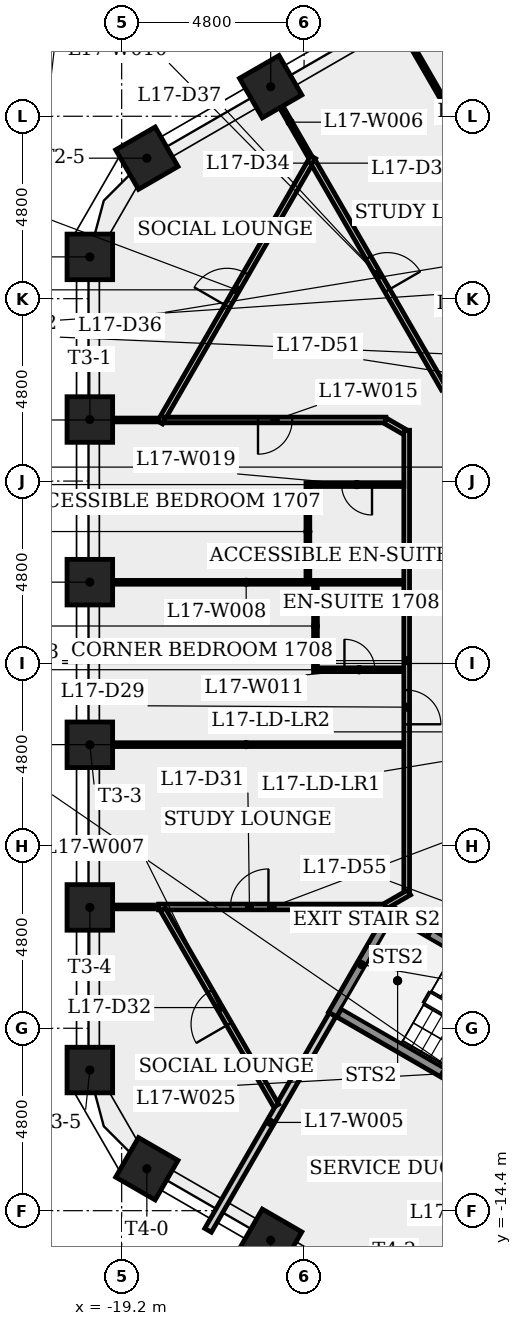
"""IFC4 building model, lengths in metres.
Left out: names, types, materials, properties, quantities, classifications, styles, units other than length and angle.
Written with IfcOpenShell. Run it as: python <this file> out.ifc"""

import sys

from ifc_helpers import new_model, si_unit, direction, frame, frame_2d, origin, origin_2d, place, context, subcontext, project, spatial, rectangle, extrude, element, fill, save


model = new_model("IFC4")
c1 = context("Model", 3, precision=1e-05, world=origin(), true_north=direction((0.0, 1.0)))
c2 = subcontext(c1, "Body", "Model", "MODEL_VIEW")
j1 = project(units=[si_unit("LENGTHUNIT", "METRE"), si_unit("PLANEANGLEUNIT", "RADIAN")], contexts=[c1])
p1 = place(None, origin())
s1 = spatial("IfcSite", under=j1, at=p1, CompositionType="ELEMENT")
p2 = place(p1, origin())
s2 = spatial("IfcBuilding", under=s1, at=p2, CompositionType="ELEMENT")
p3 = place(p2, frame((0.0, 0.0, 66.3)))
s3 = spatial("IfcBuildingStorey", under=s2, at=p3, CompositionType="ELEMENT", Elevation=66.3)
for number, where, z_axis, x_axis in (
    (1, (-15.28, 15.178, 0.0), (0.0, 0.0, 1.0), (-0.5, 0.866, 0.0)),
    (2, (-18.538, 13.297, 0.0), (0.0, 0.0, 1.0), (-0.5, 0.866, 0.0)),
    (3, (-20.038, 10.699, 0.0), (0.0, 0.0, 1.0), (-1.0, 0.0, 0.0)),
    (4, (-20.038, 6.42, 0.0), (0.0, 0.0, 1.0), (-1.0, 0.0, 0.0)),
    (5, (-20.038, 2.14, 0.0), (0.0, 0.0, 1.0), (-1.0, 0.0, 0.0)),
    (6, (-20.038, -2.14, 0.0), (0.0, 0.0, 1.0), (-1.0, 0.0, 0.0)),
    (7, (-20.038, -6.42, 0.0), (0.0, 0.0, 1.0), (-1.0, 0.0, 0.0)),
    (8, (-20.038, -10.699, 0.0), (0.0, 0.0, 1.0), (-1.0, 0.0, 0.0)),
    (9, (-18.538, -13.297, 0.0), (0.0, 0.0, 1.0), (-0.5, -0.866, 0.0)),
    (10, (-15.28, -15.178, 0.0), (0.0, 0.0, 1.0), (-0.5, -0.866, 0.0)),
):
    element("IfcColumn", number, at=place(p3, frame(where, z_axis=z_axis, x_axis=x_axis)), inside=s3, PredefinedType="COLUMN", context=c2, shape_type="SweptSolid", body=[
        extrude(rectangle(XDim=1.2, YDim=1.2, at=origin_2d()), origin(), (0.0, 0.0, 1.0), 4.0),
    ])
p4 = place(p3, frame((-18.228, 6.407, 0.0), z_axis=(0.0, 0.0, 1.0), x_axis=(-1.0, 0.0, 0.0)))
e11 = element("IfcWall", 11, at=p4, inside=s3, PredefinedType="PARTITIONING", context=c2, shape_type="SweptSolid", body=[
    extrude(rectangle(XDim=1.844, YDim=0.1, at=frame_2d((0.922, 0.0))), origin(), (0.0, 0.0, 1.0), 3.6),
])
p5 = place(p3, frame((-18.19, 6.343, 0.0), z_axis=(0.0, 0.0, 1.0), x_axis=(0.499980305572, 0.866036774069, 0.0)))
e12 = element("IfcWall", 12, at=p5, inside=s3, PredefinedType="PARTITIONING", context=c2, shape_type="SweptSolid", body=[
    extrude(rectangle(XDim=8.059, YDim=0.15, at=frame_2d((4.03, 0.0))), origin(), (0.0, 0.0, 1.0), 3.6),
])
p6 = place(p5, frame((3.53, 0.0, 0.0)))
e13 = element("IfcOpeningElement", 13, at=p6, cuts=e12, PredefinedType="OPENING", context=c2, shape_type="SweptSolid", body=[
    extrude(rectangle(XDim=1.0, YDim=2.1, at=frame_2d((0.5, 1.05))), frame((0.0, 0.085, 0.0), z_axis=(0.0, -1.0, 0.0), x_axis=(1.0, 0.0, 0.0)), (0.0, 0.0, 1.0), 0.17),
])
p7 = place(p3, frame((-18.228, -6.407, 0.0), z_axis=(0.0, 0.0, 1.0), x_axis=(1.0, 0.0, 0.0)))
e14 = element("IfcWall", 14, at=p7, inside=s3, PredefinedType="PARTITIONING", context=c2, shape_type="SweptSolid", body=[
    extrude(rectangle(XDim=5.981, YDim=0.15, at=frame_2d((2.99, 0.0))), origin(), (0.0, 0.0, 1.0), 3.6),
])
p8 = place(p7, frame((1.89, 0.0, 0.0)))
e15 = element("IfcOpeningElement", 15, at=p8, cuts=e14, PredefinedType="OPENING", context=c2, shape_type="SweptSolid", body=[
    extrude(rectangle(XDim=1.0, YDim=2.1, at=frame_2d((0.5, 1.05))), frame((0.0, 0.085, 0.0), z_axis=(0.0, -1.0, 0.0), x_axis=(1.0, 0.0, 0.0)), (0.0, 0.0, 1.0), 0.17),
])
p9 = place(p3, frame((-18.228, -6.407, 0.0), z_axis=(0.0, 0.0, 1.0), x_axis=(-1.0, 0.0, 0.0)))
e16 = element("IfcWall", 16, at=p9, inside=s3, PredefinedType="PARTITIONING", context=c2, shape_type="SweptSolid", body=[
    extrude(rectangle(XDim=1.845, YDim=0.1, at=frame_2d((0.922, 0.0))), origin(), (0.0, 0.0, 1.0), 3.6),
])
p10 = place(p3, frame((-16.926, -14.916, 0.0), z_axis=(0.0, 0.0, 1.0), x_axis=(0.499992165211, 0.866029927155, 0.0)))
e17 = element("IfcWall", 17, at=p10, inside=s3, PredefinedType="PLUMBINGWALL", context=c2, shape_type="SweptSolid", body=[
    extrude(rectangle(XDim=6.556, YDim=0.2, at=frame_2d((3.278, 0.0))), origin(), (0.0, 0.0, 1.0), 3.6),
])
p11 = place(p3, frame((-15.3, 15.166, 0.0), z_axis=(0.0, 0.0, 1.0), x_axis=(0.499937513688, -0.866061477268, 0.0)))
e18 = element("IfcWall", 18, at=p11, inside=s3, PredefinedType="PARTITIONING", context=c2, shape_type="SweptSolid", body=[
    extrude(rectangle(XDim=2.129, YDim=0.1, at=frame_2d((1.064, 0.0))), origin(), (0.0, 0.0, 1.0), 3.6),
])
p12 = place(p3, frame((-15.133, -11.638, 0.0), z_axis=(0.0, 0.0, 1.0), x_axis=(-0.499995262016, 0.866028139243, 0.0)))
e19 = element("IfcWall", 19, at=p12, inside=s3, PredefinedType="PARTITIONING", context=c2, shape_type="SweptSolid", body=[
    extrude(rectangle(XDim=5.965, YDim=0.15, at=frame_2d((2.982, 0.0))), origin(), (0.0, 0.0, 1.0), 3.6),
])
p13 = place(p12, frame((2.482, 0.0, 0.0)))
e20 = element("IfcOpeningElement", 20, at=p13, cuts=e19, PredefinedType="OPENING", context=c2, shape_type="SweptSolid", body=[
    extrude(rectangle(XDim=1.0, YDim=2.1, at=frame_2d((0.5, 1.05))), frame((0.0, 0.085, 0.0), z_axis=(0.0, -1.0, 0.0), x_axis=(1.0, 0.0, 0.0)), (0.0, 0.0, 1.0), 0.17),
])
p14 = place(p3, frame((-20.073, 2.136, 0.0), z_axis=(0.0, 0.0, 1.0), x_axis=(1.0, 0.0, 0.0)))
e21 = element("IfcWall", 21, at=p14, inside=s3, PredefinedType="PARTITIONING", context=c2, shape_type="SweptSolid", body=[
    extrude(rectangle(XDim=8.298, YDim=0.1, at=frame_2d((4.149, 0.0))), origin(), (0.0, 0.0, 1.0), 3.6),
])
p15 = place(p3, frame((-14.3, 4.758, 0.0), z_axis=(0.0, 0.0, 1.0), x_axis=(0.0, -1.0, 0.0)))
e22 = element("IfcWall", 22, at=p15, inside=s3, PredefinedType="PARTITIONING", context=c2, shape_type="SweptSolid", body=[
    extrude(rectangle(XDim=2.572, YDim=0.1, at=frame_2d((1.286, 0.0))), origin(), (0.0, 0.0, 1.0), 3.6),
])
p16 = place(p3, frame((-14.161, 13.192, 0.0), z_axis=(0.0, 0.0, 1.0), x_axis=(0.500005038635, -0.866022494708, 0.0)))
e23 = element("IfcWall", 23, at=p16, inside=s3, PredefinedType="PARTITIONING", context=c2, shape_type="SweptSolid", body=[
    extrude(rectangle(XDim=6.88, YDim=0.15, at=frame_2d((3.44, 0.0))), origin(), (0.0, 0.0, 1.0), 3.6),
])
p17 = place(p16, frame((2.903, 0.0, 0.0)))
e24 = element("IfcOpeningElement", 24, at=p17, cuts=e23, PredefinedType="OPENING", context=c2, shape_type="SweptSolid", body=[
    extrude(rectangle(XDim=1.0, YDim=2.1, at=frame_2d((0.5, 1.05))), frame((0.0, 0.085, 0.0), z_axis=(0.0, -1.0, 0.0), x_axis=(1.0, 0.0, 0.0)), (0.0, 0.0, 1.0), 0.17),
])
p18 = place(p3, frame((-14.15, -0.164, 0.0), z_axis=(0.0, 0.0, 1.0), x_axis=(1.0, 0.0, 0.0)))
e25 = element("IfcWall", 25, at=p18, inside=s3, PredefinedType="PARTITIONING", context=c2, shape_type="SweptSolid", body=[
    extrude(rectangle(XDim=2.375, YDim=0.1, at=frame_2d((1.188, 0.0))), origin(), (0.0, 0.0, 1.0), 3.6),
])
p19 = place(p18, frame((0.812, 0.0, 0.0)))
e26 = element("IfcOpeningElement", 26, at=p19, cuts=e25, PredefinedType="OPENING", context=c2, shape_type="SweptSolid", body=[
    extrude(rectangle(XDim=0.8, YDim=2.1, at=frame_2d((0.4, 1.05))), frame((0.0, 0.06, 0.0), z_axis=(0.0, -1.0, 0.0), x_axis=(1.0, 0.0, 0.0)), (0.0, 0.0, 1.0), 0.12),
])
p20 = place(p3, frame((-14.1, 2.086, 0.0), z_axis=(0.0, 0.0, 1.0), x_axis=(0.0, -1.0, 0.0)))
e27 = element("IfcWall", 27, at=p20, inside=s3, PredefinedType="PARTITIONING", context=c2, shape_type="SweptSolid", body=[
    extrude(rectangle(XDim=2.2, YDim=0.1, at=frame_2d((1.1, 0.0))), origin(), (0.0, 0.0, 1.0), 3.6),
])
p21 = place(p3, frame((-13.648, -9.239, 0.0), z_axis=(0.0, 0.0, 1.0), x_axis=(0.50000556753, 0.866022189346, 0.0)))
e28 = element("IfcWall", 28, at=p21, inside=s3, PredefinedType="SHEAR", context=c2, shape_type="SweptSolid", body=[
    extrude(rectangle(XDim=3.036, YDim=0.25, at=frame_2d((1.518, 0.0))), origin(), (0.0, 0.0, 1.0), 3.6),
])
p22 = place(p3, frame((-12.26, -6.385, 0.0), z_axis=(0.0, 0.0, 1.0), x_axis=(0.865943239699, 0.500142285375, 0.0)))
e29 = element("IfcWall", 29, at=p22, inside=s3, PredefinedType="PARTITIONING", context=c2, shape_type="SweptSolid", body=[
    extrude(rectangle(XDim=0.721, YDim=0.15, at=frame_2d((0.361, 0.0))), origin(), (0.0, 0.0, 1.0), 3.6),
])
p23 = place(p3, frame((-12.247, 6.407, 0.0), z_axis=(0.0, 0.0, 1.0), x_axis=(-1.0, 0.0, 0.0)))
e30 = element("IfcWall", 30, at=p23, inside=s3, PredefinedType="PARTITIONING", context=c2, shape_type="SweptSolid", body=[
    extrude(rectangle(XDim=5.831, YDim=0.15, at=frame_2d((2.916, 0.0))), origin(), (0.0, 0.0, 1.0), 3.6),
])
p24 = place(p23, frame((2.466, 0.0, 0.0)))
e31 = element("IfcOpeningElement", 31, at=p24, cuts=e30, PredefinedType="OPENING", context=c2, shape_type="SweptSolid", body=[
    extrude(rectangle(XDim=0.9, YDim=2.1, at=frame_2d((0.45, 1.05))), frame((0.0, 0.085, 0.0), z_axis=(0.0, -1.0, 0.0), x_axis=(1.0, 0.0, 0.0)), (0.0, 0.0, 1.0), 0.17),
])
p25 = place(p3, frame((-12.085, -6.532, 0.0), z_axis=(0.0, 0.0, 1.0), x_axis=(0.86604373436, -0.499968249168, 0.0)))
e32 = element("IfcWall", 32, at=p25, inside=s3, PredefinedType="SHEAR", context=c2, shape_type="SweptSolid", body=[
    extrude(rectangle(XDim=1.118, YDim=0.25, at=frame_2d((0.559, 0.0))), origin(), (0.0, 0.0, 1.0), 3.6),
])
p26 = place(p3, frame((-11.775, -2.136, 0.0), z_axis=(0.0, 0.0, 1.0), x_axis=(-1.0, 0.0, 0.0)))
e33 = element("IfcWall", 33, at=p26, inside=s3, PredefinedType="PARTITIONING", context=c2, shape_type="SweptSolid", body=[
    extrude(rectangle(XDim=8.298, YDim=0.1, at=frame_2d((4.149, 0.0))), origin(), (0.0, 0.0, 1.0), 3.6),
])
p27 = place(p3, frame((-11.7, 6.137, 0.0), z_axis=(0.0, 0.0, 1.0), x_axis=(0.0, -1.0, 0.0)))
e34 = element("IfcWall", 34, at=p27, inside=s3, PredefinedType="PARTITIONING", context=c2, shape_type="SweptSolid", body=[
    extrude(rectangle(XDim=12.125, YDim=0.15, at=frame_2d((6.062, 0.0))), origin(), (0.0, 0.0, 1.0), 3.6),
])
p28 = place(p27, frame((6.837, 0.0, 0.0)))
e35 = element("IfcOpeningElement", 35, at=p28, cuts=e34, PredefinedType="OPENING", context=c2, shape_type="SweptSolid", body=[
    extrude(rectangle(XDim=0.9, YDim=2.1, at=frame_2d((0.45, 1.05))), frame((0.0, 0.085, 0.0), z_axis=(0.0, -1.0, 0.0), x_axis=(1.0, 0.0, 0.0)), (0.0, 0.0, 1.0), 0.17),
])
p29 = place(p3, frame((-11.775, 4.708, 0.0), z_axis=(0.0, 0.0, 1.0), x_axis=(-1.0, 0.0, 0.0)))
e36 = element("IfcWall", 36, at=p29, inside=s3, PredefinedType="PARTITIONING", context=c2, shape_type="SweptSolid", body=[
    extrude(rectangle(XDim=2.475, YDim=0.1, at=frame_2d((1.238, 0.0))), origin(), (0.0, 0.0, 1.0), 3.6),
])
p30 = place(p29, frame((0.837, 0.0, 0.0)))
e37 = element("IfcOpeningElement", 37, at=p30, cuts=e36, PredefinedType="OPENING", context=c2, shape_type="SweptSolid", body=[
    extrude(rectangle(XDim=0.8, YDim=2.1, at=frame_2d((0.4, 1.05))), frame((0.0, 0.06, 0.0), z_axis=(0.0, -1.0, 0.0), x_axis=(1.0, 0.0, 0.0)), (0.0, 0.0, 1.0), 0.12),
])
p31 = place(p3, frame((-11.765, 6.1, 0.0), z_axis=(0.0, 0.0, 1.0), x_axis=(-0.865893856247, 0.500227777832, 0.0)))
e38 = element("IfcWall", 38, at=p31, inside=s3, PredefinedType="PARTITIONING", context=c2, shape_type="SweptSolid", body=[
    extrude(rectangle(XDim=0.572, YDim=0.15, at=frame_2d((0.286, 0.0))), origin(), (0.0, 0.0, 1.0), 3.6),
])
p32 = place(p3, frame((-11.1, -7.101, 0.0), z_axis=(0.0, 0.0, 1.0), x_axis=(0.866028615007, -0.499994437958, 0.0)))
e39 = element("IfcWall", 39, at=p32, inside=s3, PredefinedType="SHEAR", context=c2, shape_type="SweptSolid", body=[
    extrude(rectangle(XDim=5.387, YDim=0.25, at=frame_2d((2.694, 0.0))), origin(), (0.0, 0.0, 1.0), 3.6),
])
p33 = place(p32, frame((4.012, 0.0, 0.0)))
e40 = element("IfcOpeningElement", 40, at=p33, cuts=e39, PredefinedType="OPENING", context=c2, shape_type="SweptSolid", body=[
    extrude(rectangle(XDim=1.0, YDim=2.1, at=frame_2d((0.5, 1.05))), frame((0.0, 0.135, 0.0), z_axis=(0.0, -1.0, 0.0), x_axis=(1.0, 0.0, 0.0)), (0.0, 0.0, 1.0), 0.27),
])
p34 = place(p3, frame((-7.935, -12.393, 0.0), z_axis=(0.0, 0.0, 1.0), x_axis=(-0.866025499775, 0.499999833739, 0.0)))
e41 = element("IfcWall", 41, at=p34, inside=s3, PredefinedType="SHEAR", context=c2, shape_type="SweptSolid", body=[
    extrude(rectangle(XDim=6.4, YDim=0.25, at=frame_2d((3.2, 0.0))), origin(), (0.0, 0.0, 1.0), 3.6),
])
p35 = place(p3, frame((-7.8, -13.51, 0.0), z_axis=(0.0, 0.0, 1.0), x_axis=(-0.499982030767, -0.866035778077, 0.0)))
e42 = element("IfcWall", 42, at=p35, inside=s3, PredefinedType="PLUMBINGWALL", context=c2, shape_type="SweptSolid", body=[
    extrude(rectangle(XDim=5.781, YDim=0.2, at=frame_2d((2.89, 0.0))), origin(), (0.0, 0.0, 1.0), 3.6),
])
p36 = place(p3, frame((-7.523, 9.253, 0.0), z_axis=(0.0, 0.0, 1.0), x_axis=(-0.500009404554, 0.866019973994, 0.0)))
e43 = element("IfcWall", 43, at=p36, inside=s3, PredefinedType="PARTITIONING", context=c2, shape_type="SweptSolid", body=[
    extrude(rectangle(XDim=9.01, YDim=0.1, at=frame_2d((4.505, 0.0))), origin(), (0.0, 0.0, 1.0), 3.6),
])
p37 = place(p6, origin())
e44 = element("IfcDoor", 44, at=p37, inside=s3, OperationType="SINGLE_SWING_LEFT", PredefinedType="DOOR", context=c2, shape_type="SweptSolid", body=[
    extrude(rectangle(XDim=1.0, YDim=2.1, at=frame_2d((0.5, 1.05))), frame((0.0, 0.025, 0.0), z_axis=(0.0, -1.0, 0.0), x_axis=(1.0, 0.0, 0.0)), (0.0, 0.0, 1.0), 0.05),
])
fill(e13, e44)
p38 = place(p24, origin())
e45 = element("IfcDoor", 45, at=p38, inside=s3, OperationType="SINGLE_SWING_RIGHT", PredefinedType="DOOR", context=c2, shape_type="SweptSolid", body=[
    extrude(rectangle(XDim=0.9, YDim=2.1, at=frame_2d((0.45, 1.05))), frame((0.0, 0.025, 0.0), z_axis=(0.0, -1.0, 0.0), x_axis=(1.0, 0.0, 0.0)), (0.0, 0.0, 1.0), 0.05),
])
fill(e31, e45)
p39 = place(p30, origin())
e46 = element("IfcDoor", 46, at=p39, inside=s3, OperationType="SINGLE_SWING_LEFT", PredefinedType="DOOR", context=c2, shape_type="SweptSolid", body=[
    extrude(rectangle(XDim=0.8, YDim=2.1, at=frame_2d((0.4, 1.05))), frame((0.0, 0.025, 0.0), z_axis=(0.0, -1.0, 0.0), x_axis=(1.0, 0.0, 0.0)), (0.0, 0.0, 1.0), 0.05),
])
fill(e37, e46)
p40 = place(p28, origin())
e47 = element("IfcDoor", 47, at=p40, inside=s3, OperationType="SINGLE_SWING_RIGHT", PredefinedType="DOOR", context=c2, shape_type="SweptSolid", body=[
    extrude(rectangle(XDim=0.9, YDim=2.1, at=frame_2d((0.45, 1.05))), frame((0.0, 0.025, 0.0), z_axis=(0.0, -1.0, 0.0), x_axis=(1.0, 0.0, 0.0)), (0.0, 0.0, 1.0), 0.05),
])
fill(e35, e47)
p41 = place(p19, origin())
e48 = element("IfcDoor", 48, at=p41, inside=s3, OperationType="SINGLE_SWING_LEFT", PredefinedType="DOOR", context=c2, shape_type="SweptSolid", body=[
    extrude(rectangle(XDim=0.8, YDim=2.1, at=frame_2d((0.4, 1.05))), frame((0.0, 0.025, 0.0), z_axis=(0.0, -1.0, 0.0), x_axis=(1.0, 0.0, 0.0)), (0.0, 0.0, 1.0), 0.05),
])
fill(e26, e48)
p42 = place(p8, origin())
e49 = element("IfcDoor", 49, at=p42, inside=s3, OperationType="SINGLE_SWING_RIGHT", PredefinedType="DOOR", context=c2, shape_type="SweptSolid", body=[
    extrude(rectangle(XDim=1.0, YDim=2.1, at=frame_2d((0.5, 1.05))), frame((0.0, 0.025, 0.0), z_axis=(0.0, -1.0, 0.0), x_axis=(1.0, 0.0, 0.0)), (0.0, 0.0, 1.0), 0.05),
])
fill(e15, e49)
p43 = place(p13, origin())
e50 = element("IfcDoor", 50, at=p43, inside=s3, OperationType="SINGLE_SWING_LEFT", PredefinedType="DOOR", context=c2, shape_type="SweptSolid", body=[
    extrude(rectangle(XDim=1.0, YDim=2.1, at=frame_2d((0.5, 1.05))), frame((0.0, 0.025, 0.0), z_axis=(0.0, -1.0, 0.0), x_axis=(1.0, 0.0, 0.0)), (0.0, 0.0, 1.0), 0.05),
])
fill(e20, e50)
p44 = place(p17, origin())
e51 = element("IfcDoor", 51, at=p44, inside=s3, OperationType="SINGLE_SWING_RIGHT", PredefinedType="DOOR", context=c2, shape_type="SweptSolid", body=[
    extrude(rectangle(XDim=1.0, YDim=2.1, at=frame_2d((0.5, 1.05))), frame((0.0, 0.025, 0.0), z_axis=(0.0, -1.0, 0.0), x_axis=(1.0, 0.0, 0.0)), (0.0, 0.0, 1.0), 0.05),
])
fill(e24, e51)
save(model, sys.argv[1])
